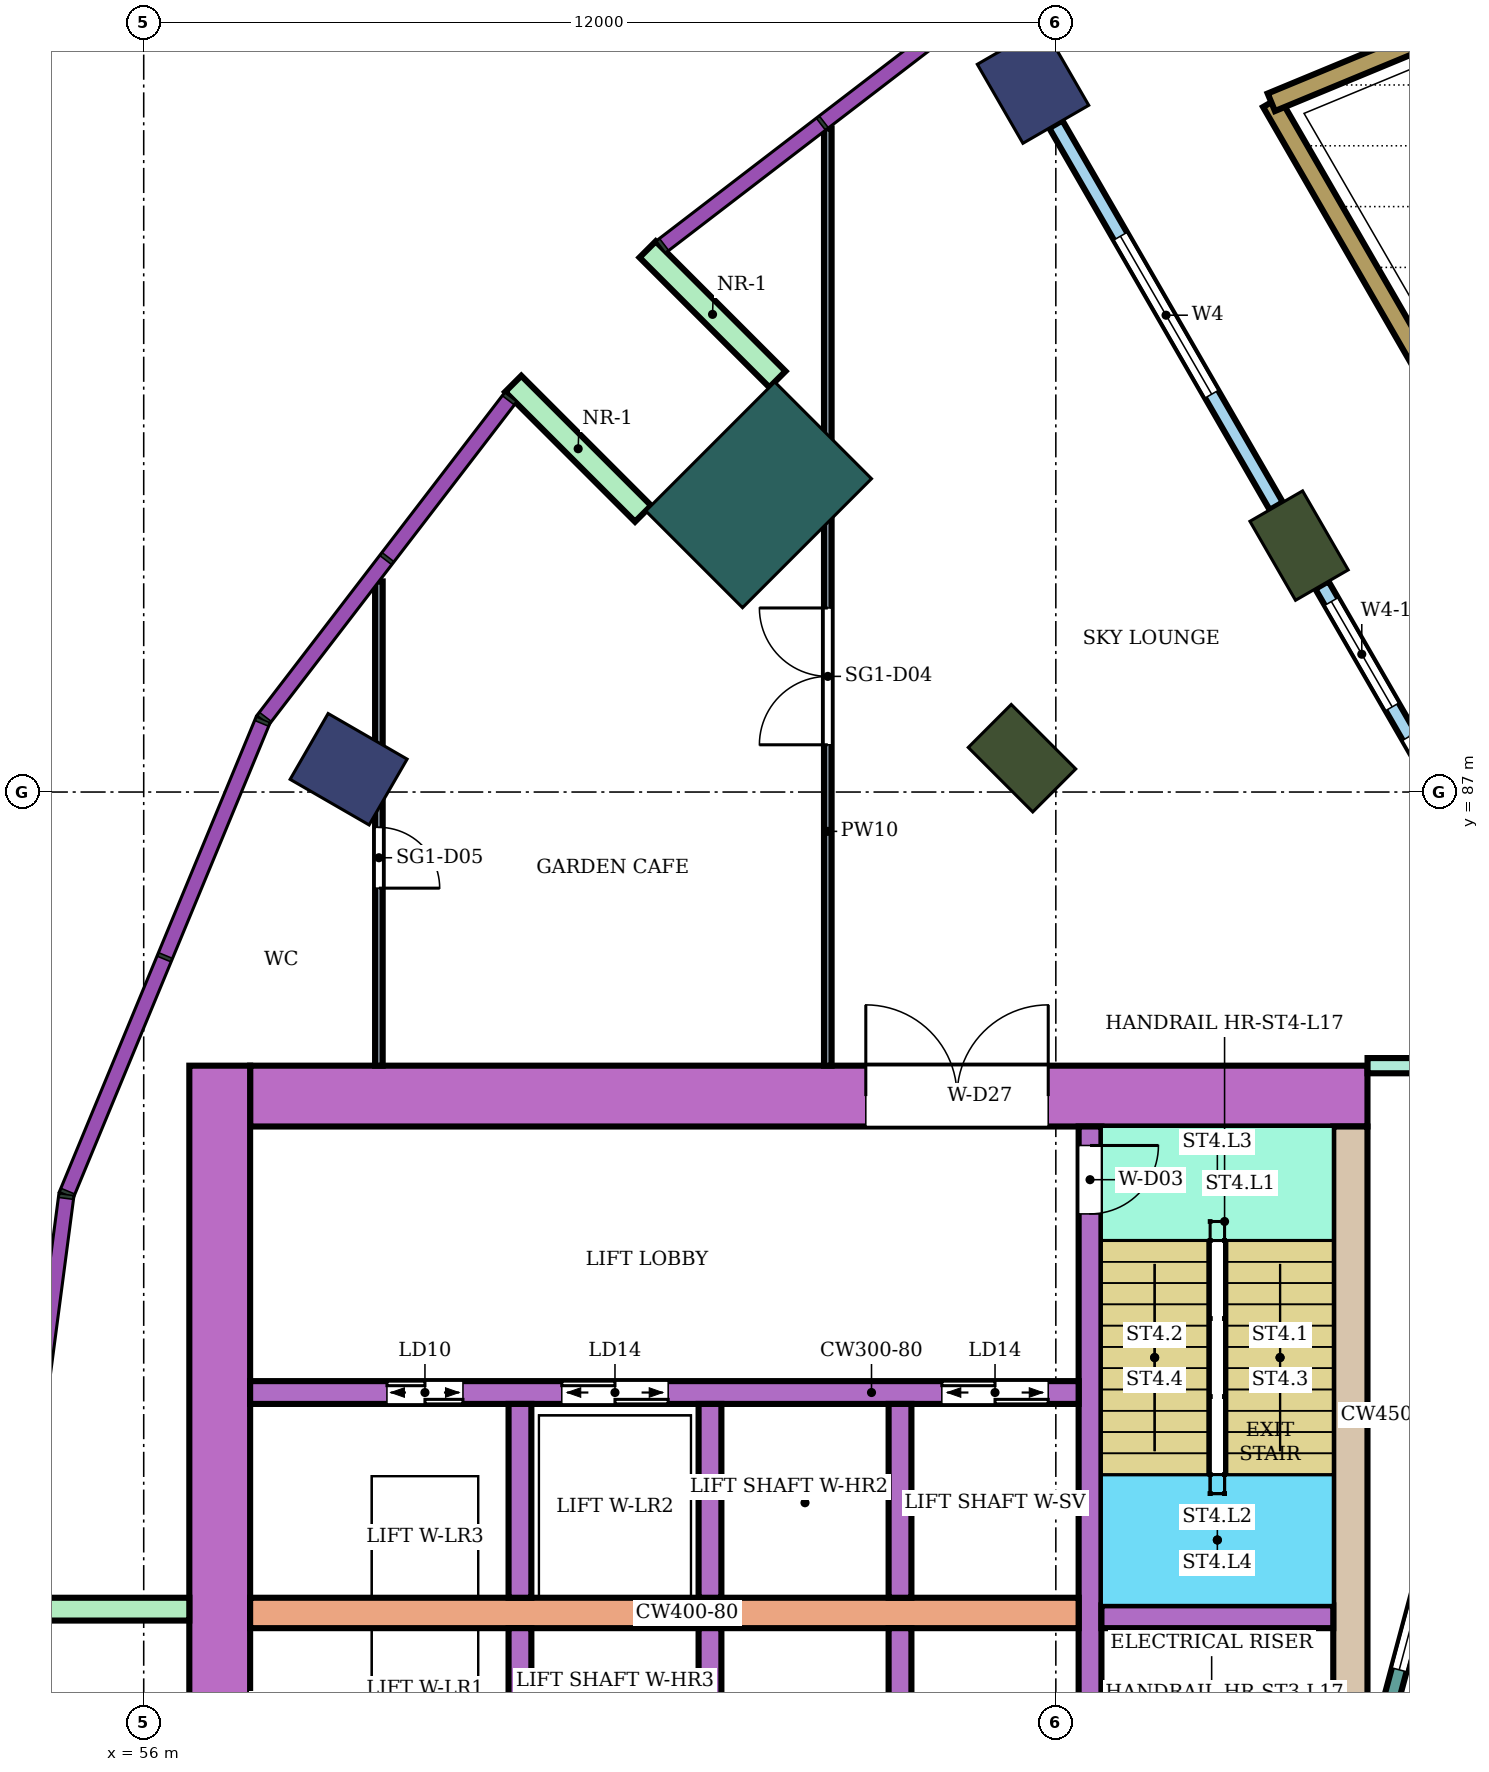
"""IFC4 building model, lengths in metres.
Left out: names, types, materials, properties, quantities, classifications, styles, units other than length and angle.
Written with IfcOpenShell. Run it as: python <this file> out.ifc"""

import sys

from ifc_helpers import new_model, si_unit, direction, frame, frame_2d, origin, origin_2d, place, context, subcontext, project, spatial, rectangle, extrude, element, fill, save


model = new_model("IFC4")
c1 = context("Model", 3, precision=1e-05, world=origin(), true_north=direction((0.0, 1.0)))
c2 = subcontext(c1, "Body", "Model", "MODEL_VIEW")
j1 = project(units=[si_unit("LENGTHUNIT", "METRE"), si_unit("PLANEANGLEUNIT", "RADIAN")], contexts=[c1])
p1 = place(None, origin())
s1 = spatial("IfcSite", under=j1, at=p1, CompositionType="ELEMENT")
p2 = place(p1, origin())
s2 = spatial("IfcBuilding", under=s1, at=p2, CompositionType="ELEMENT")
p3 = place(p2, frame((0.0, 0.0, 74.4)))
s3 = spatial("IfcBuildingStorey", under=s2, at=p3, CompositionType="ELEMENT", Elevation=74.4)
for number, where, z_axis, x_axis in (
    (1, (67.7, 96.304, 0.0), (0.0, 0.0, 1.0), (-0.5, 0.866, 0.0)),
    (2, (58.696, 87.3, 0.0), (0.0, 0.0, 1.0), (-0.866, 0.5, 0.0)),
):
    element("IfcColumn", number, at=place(p3, frame(where, z_axis=z_axis, x_axis=x_axis)), inside=s3, PredefinedType="COLUMN", context=c2, shape_type="SweptSolid", body=[
        extrude(rectangle(XDim=1.2, YDim=1.0, at=origin_2d()), origin(), (0.0, 0.0, 1.0), 8.0),
    ])
for number, where, z_axis, x_axis in (
    (3, (71.2, 90.242, 0.0), (0.0, 0.0, 1.0), (-0.5, 0.866, 0.0)),
    (4, (67.555, 87.445, 0.0), (0.0, 0.0, 1.0), (-0.707, 0.707, 0.0)),
):
    element("IfcColumn", number, at=place(p3, frame(where, z_axis=z_axis, x_axis=x_axis)), inside=s3, PredefinedType="COLUMN", context=c2, shape_type="SweptSolid", body=[
        extrude(rectangle(XDim=1.2, YDim=0.8, at=origin_2d()), origin(), (0.0, 0.0, 1.0), 8.0),
    ])
p4 = place(p3, frame((64.09, 90.91, 0.0), z_axis=(0.0, 0.0, 1.0), x_axis=(-0.707106781187, 0.707106781187, 0.0)))
e5 = element("IfcColumn", 5, at=p4, inside=s3, PredefinedType="COLUMN", context=c2, shape_type="SweptSolid", body=[
    extrude(rectangle(XDim=1.8, YDim=2.4, at=origin_2d()), origin(), (0.0, 0.0, 1.0), 8.0),
])
p5 = place(p3, frame((72.1, 83.0, 0.0), z_axis=(0.0, 0.0, 1.0), x_axis=(-1.0, 0.0, 0.0)))
e6 = element("IfcWall", 6, at=p5, inside=s3, PredefinedType="SHEAR", context=c2, shape_type="SweptSolid", body=[
    extrude(rectangle(XDim=14.7, YDim=0.8, at=frame_2d((7.35, 0.0))), origin(), (0.0, 0.0, 1.0), 7.68),
])
p6 = place(p5, frame((4.2, 0.0, 0.0)))
e7 = element("IfcOpeningElement", 7, at=p6, cuts=e6, PredefinedType="OPENING", context=c2, shape_type="SweptSolid", body=[
    extrude(rectangle(XDim=2.4, YDim=2.4, at=frame_2d((1.2, 1.2))), frame((0.0, 0.41, 0.0), z_axis=(0.0, -1.0, 0.0), x_axis=(1.0, 0.0, 0.0)), (0.0, 0.0, 1.0), 0.82),
])
p7 = place(p3, frame((71.875, 82.6, 0.0), z_axis=(0.0, 0.0, 1.0), x_axis=(0.0, -1.0, 0.0)))
e8 = element("IfcWall", 8, at=p7, inside=s3, PredefinedType="SHEAR", context=c2, shape_type="SweptSolid", body=[
    extrude(rectangle(XDim=7.6, YDim=0.45, at=frame_2d((3.8, 0.0))), origin(), (0.0, 0.0, 1.0), 7.68),
])
p8 = place(p3, frame((57.0, 83.4, 0.0), z_axis=(0.0, 0.0, 1.0), x_axis=(0.0, -1.0, 0.0)))
e9 = element("IfcWall", 9, at=p8, inside=s3, PredefinedType="SHEAR", context=c2, shape_type="SweptSolid", body=[
    extrude(rectangle(XDim=16.8, YDim=0.8, at=frame_2d((8.4, 0.0))), origin(), (0.0, 0.0, 1.0), 7.68),
])
p9 = place(p3, frame((68.45, 82.6, 0.0), z_axis=(0.0, 0.0, 1.0), x_axis=(0.0, -1.0, 0.0)))
e10 = element("IfcWall", 10, at=p9, inside=s3, PredefinedType="SHEAR", context=c2, shape_type="SweptSolid", body=[
    extrude(rectangle(XDim=7.6, YDim=0.3, at=frame_2d((3.8, 0.0))), origin(), (0.0, 0.0, 1.0), 7.68),
])
p10 = place(p9, frame((0.25, 0.0, 0.0)))
e11 = element("IfcOpeningElement", 11, at=p10, cuts=e10, PredefinedType="OPENING", context=c2, shape_type="SweptSolid", body=[
    extrude(rectangle(XDim=0.9, YDim=2.1, at=frame_2d((0.45, 1.05))), frame((0.0, 0.16, 0.0), z_axis=(0.0, -1.0, 0.0), x_axis=(1.0, 0.0, 0.0)), (0.0, 0.0, 1.0), 0.32),
])
p11 = place(p3, frame((71.65, 76.15, 0.0), z_axis=(0.0, 0.0, 1.0), x_axis=(-1.0, 0.0, 0.0)))
e12 = element("IfcWall", 12, at=p11, inside=s3, PredefinedType="SHEAR", context=c2, shape_type="SweptSolid", body=[
    extrude(rectangle(XDim=3.05, YDim=0.3, at=frame_2d((1.525, 0.0))), origin(), (0.0, 0.0, 1.0), 7.68),
])
p12 = place(p3, frame((68.3, 76.2, 0.0), z_axis=(0.0, 0.0, 1.0), x_axis=(-1.0, 0.0, 0.0)))
e13 = element("IfcWall", 13, at=p12, inside=s3, PredefinedType="SHEAR", context=c2, shape_type="SweptSolid", body=[
    extrude(rectangle(XDim=10.9, YDim=0.4, at=frame_2d((5.45, 0.0))), origin(), (0.0, 0.0, 1.0), 7.68),
])
p13 = place(p3, frame((68.3, 79.1, 0.0), z_axis=(0.0, 0.0, 1.0), x_axis=(-1.0, 0.0, 0.0)))
e14 = element("IfcWall", 14, at=p13, inside=s3, PredefinedType="SHEAR", context=c2, shape_type="SweptSolid", body=[
    extrude(rectangle(XDim=10.9, YDim=0.3, at=frame_2d((5.45, 0.0))), origin(), (0.0, 0.0, 1.0), 7.68),
])
p14 = place(p13, frame((0.4, 0.0, 0.0)))
e15 = element("IfcOpeningElement", 15, at=p14, cuts=e14, PredefinedType="OPENING", context=c2, shape_type="SweptSolid", body=[
    extrude(rectangle(XDim=1.4, YDim=2.1, at=frame_2d((0.7, 1.05))), frame((0.0, 0.16, 0.0), z_axis=(0.0, -1.0, 0.0), x_axis=(1.0, 0.0, 0.0)), (0.0, 0.0, 1.0), 0.32),
])
p15 = place(p13, frame((5.4, 0.0, 0.0)))
e16 = element("IfcOpeningElement", 16, at=p15, cuts=e14, PredefinedType="OPENING", context=c2, shape_type="SweptSolid", body=[
    extrude(rectangle(XDim=1.4, YDim=2.1, at=frame_2d((0.7, 1.05))), frame((0.0, 0.16, 0.0), z_axis=(0.0, -1.0, 0.0), x_axis=(1.0, 0.0, 0.0)), (0.0, 0.0, 1.0), 0.32),
])
p16 = place(p13, frame((8.1, 0.0, 0.0)))
e17 = element("IfcOpeningElement", 17, at=p16, cuts=e14, PredefinedType="OPENING", context=c2, shape_type="SweptSolid", body=[
    extrude(rectangle(XDim=1.0, YDim=2.1, at=frame_2d((0.5, 1.05))), frame((0.0, 0.16, 0.0), z_axis=(0.0, -1.0, 0.0), x_axis=(1.0, 0.0, 0.0)), (0.0, 0.0, 1.0), 0.32),
])
for number, where, z_axis, x_axis in (
    (18, (65.95, 76.0, 0.0), (0.0, 0.0, 1.0), (0.0, -1.0, 0.0)),
    (19, (63.45, 76.0, 0.0), (0.0, 0.0, 1.0), (0.0, -1.0, 0.0)),
    (20, (60.95, 76.0, 0.0), (0.0, 0.0, 1.0), (0.0, -1.0, 0.0)),
    (21, (65.95, 78.95, 0.0), (0.0, 0.0, 1.0), (0.0, -1.0, 0.0)),
    (22, (63.45, 78.95, 0.0), (0.0, 0.0, 1.0), (0.0, -1.0, 0.0)),
    (23, (60.95, 78.95, 0.0), (0.0, 0.0, 1.0), (0.0, -1.0, 0.0)),
):
    element("IfcWall", number, at=place(p3, frame(where, z_axis=z_axis, x_axis=x_axis)), inside=s3, PredefinedType="SHEAR", context=c2, shape_type="SweptSolid", body=[
        extrude(rectangle(XDim=2.55, YDim=0.3, at=frame_2d((1.275, 0.0))), origin(), (0.0, 0.0, 1.0), 7.68),
    ])
for number, where, z_axis, x_axis in (
    (24, (64.338, 92.43, 0.0), (0.0, 0.0, 1.0), (-0.707, 0.707, 0.0)),
    (25, (62.57, 90.662, 0.0), (0.0, 0.0, 1.0), (-0.707, 0.707, 0.0)),
    (26, (56.6, 76.25, 0.0), (0.0, 0.0, 1.0), (-1.0, 0.0, 0.0)),
):
    element("IfcWall", number, at=place(p3, frame(where, z_axis=z_axis, x_axis=x_axis)), inside=s3, PredefinedType="NOTDEFINED", context=c2, shape_type="SweptSolid", body=[
        extrude(rectangle(XDim=2.416, YDim=0.3, at=frame_2d((1.208, 0.0))), origin(), (0.0, 0.0, 1.0), 8.0),
    ])
p17 = place(p3, frame((73.415, 78.802, 0.0), z_axis=(0.0, 0.0, 1.0), x_axis=(-0.258789828301, -0.965933654434, 0.0)))
e27 = element("IfcWall", 27, at=p17, inside=s3, PredefinedType="NOTDEFINED", context=c2, shape_type="SweptSolid", body=[
    extrude(rectangle(XDim=3.936, YDim=0.2, at=frame_2d((1.968, 0.0))), origin(), (0.0, 0.0, 1.0), 8.0),
])
p18 = place(p17, frame((0.468, 0.0, 0.9)))
e28 = element("IfcOpeningElement", 28, at=p18, cuts=e27, PredefinedType="OPENING", context=c2, shape_type="SweptSolid", body=[
    extrude(rectangle(XDim=3.0, YDim=2.3, at=frame_2d((1.5, 1.15))), frame((0.0, 0.11, 0.0), z_axis=(0.0, -1.0, 0.0), x_axis=(1.0, 0.0, 0.0)), (0.0, 0.0, 1.0), 0.22),
])
p19 = place(p3, frame((70.835, 96.074, 0.0), z_axis=(0.0, 0.0, 1.0), x_axis=(0.500003486784, -0.866023390679, 0.0)))
e29 = element("IfcWall", 29, at=p19, inside=s3, PredefinedType="USERDEFINED", context=c2, shape_type="SweptSolid", body=[
    extrude(rectangle(XDim=5.966, YDim=0.25, at=frame_2d((2.983, 0.0))), origin(), (0.0, 0.0, 1.0), 0.6),
])
p20 = place(p3, frame((73.986, 97.38, 0.0), z_axis=(0.0, 0.0, 1.0), x_axis=(-0.923871147788, -0.38270367425, 0.0)))
e30 = element("IfcWall", 30, at=p20, inside=s3, PredefinedType="USERDEFINED", context=c2, shape_type="SweptSolid", body=[
    extrude(rectangle(XDim=3.411, YDim=0.25, at=frame_2d((1.706, 0.0))), origin(), (0.0, 0.0, 1.0), 0.6),
])
p21 = place(p3, frame((75.475, 82.838, 0.0), z_axis=(0.0, 0.0, 1.0), x_axis=(-0.50001663867, 0.86601579723, 0.0)))
e31 = element("IfcWall", 31, at=p21, inside=s3, PredefinedType="NOTDEFINED", context=c2, shape_type="SweptSolid", body=[
    extrude(rectangle(XDim=7.95, YDim=0.2, at=frame_2d((3.975, 0.0))), origin(), (0.0, 0.0, 1.0), 8.0),
])
p22 = place(p21, frame((1.0, 0.0, 0.3)))
e32 = element("IfcOpeningElement", 32, at=p22, cuts=e31, PredefinedType="OPENING", context=c2, shape_type="SweptSolid", body=[
    extrude(rectangle(XDim=2.4, YDim=3.6, at=frame_2d((1.2, 1.8))), frame((0.0, 0.11, 0.0), z_axis=(0.0, -1.0, 0.0), x_axis=(1.0, 0.0, 0.0)), (0.0, 0.0, 1.0), 0.22),
])
p23 = place(p21, frame((3.85, 0.0, 0.0)))
e33 = element("IfcOpeningElement", 33, at=p23, cuts=e31, PredefinedType="OPENING", context=c2, shape_type="SweptSolid", body=[
    extrude(rectangle(XDim=1.8, YDim=2.4, at=frame_2d((0.9, 1.2))), frame((0.0, 0.11, 0.0), z_axis=(0.0, -1.0, 0.0), x_axis=(1.0, 0.0, 0.0)), (0.0, 0.0, 1.0), 0.22),
])
p24 = place(p21, frame((6.1, 0.0, 0.3)))
e34 = element("IfcOpeningElement", 34, at=p24, cuts=e31, PredefinedType="OPENING", context=c2, shape_type="SweptSolid", body=[
    extrude(rectangle(XDim=1.6, YDim=3.6, at=frame_2d((0.8, 1.8))), frame((0.0, 0.11, 0.0), z_axis=(0.0, -1.0, 0.0), x_axis=(1.0, 0.0, 0.0)), (0.0, 0.0, 1.0), 0.22),
])
p25 = place(p3, frame((70.9, 90.762, 0.0), z_axis=(0.0, 0.0, 1.0), x_axis=(-0.499987231761, 0.866032775405, 0.0)))
e35 = element("IfcWall", 35, at=p25, inside=s3, PredefinedType="NOTDEFINED", context=c2, shape_type="SweptSolid", body=[
    extrude(rectangle(XDim=5.8, YDim=0.2, at=frame_2d((2.9, 0.0))), origin(), (0.0, 0.0, 1.0), 8.0),
])
p26 = place(p25, frame((1.7, 0.0, 0.3)))
e36 = element("IfcOpeningElement", 36, at=p26, cuts=e35, PredefinedType="OPENING", context=c2, shape_type="SweptSolid", body=[
    extrude(rectangle(XDim=2.4, YDim=3.6, at=frame_2d((1.2, 1.8))), frame((0.0, 0.11, 0.0), z_axis=(0.0, -1.0, 0.0), x_axis=(1.0, 0.0, 0.0)), (0.0, 0.0, 1.0), 0.22),
])
p27 = place(p3, frame((72.101, 83.4, 0.0), z_axis=(0.0, 0.0, 1.0), x_axis=(1.0, 0.0, 0.0)))
e37 = element("IfcWall", 37, at=p27, inside=s3, PredefinedType="PARTITIONING", context=c2, shape_type="SweptSolid", body=[
    extrude(rectangle(XDim=3.048, YDim=0.2, at=frame_2d((1.524, 0.0))), origin(), (0.0, 0.0, 1.0), 7.55),
])
p28 = place(p3, frame((59.094, 83.4, 0.0), z_axis=(0.0, 0.0, 1.0), x_axis=(0.0, 1.0, 0.0)))
e38 = element("IfcWall", 38, at=p28, inside=s3, PredefinedType="PARTITIONING", context=c2, shape_type="SweptSolid", body=[
    extrude(rectangle(XDim=6.371, YDim=0.1, at=frame_2d((3.186, 0.0))), origin(), (0.0, 0.0, 1.0), 7.55),
])
p29 = place(p28, frame((2.335, 0.0, 0.0)))
e39 = element("IfcOpeningElement", 39, at=p29, cuts=e38, PredefinedType="OPENING", context=c2, shape_type="SweptSolid", body=[
    extrude(rectangle(XDim=0.8, YDim=2.1, at=frame_2d((0.4, 1.05))), frame((0.0, 0.06, 0.0), z_axis=(0.0, -1.0, 0.0), x_axis=(1.0, 0.0, 0.0)), (0.0, 0.0, 1.0), 0.12),
])
p30 = place(p3, frame((65.0, 83.4, 0.0), z_axis=(0.0, 0.0, 1.0), x_axis=(0.0, 1.0, 0.0)))
e40 = element("IfcWall", 40, at=p30, inside=s3, PredefinedType="PARTITIONING", context=c2, shape_type="SweptSolid", body=[
    extrude(rectangle(XDim=12.33, YDim=0.1, at=frame_2d((6.165, 0.0))), origin(), (0.0, 0.0, 1.0), 7.55),
])
p31 = place(p30, frame((4.221, 0.0, 0.0)))
e41 = element("IfcOpeningElement", 41, at=p31, cuts=e40, PredefinedType="OPENING", context=c2, shape_type="SweptSolid", body=[
    extrude(rectangle(XDim=1.8, YDim=2.1, at=frame_2d((0.9, 1.05))), frame((0.0, 0.06, 0.0), z_axis=(0.0, -1.0, 0.0), x_axis=(1.0, 0.0, 0.0)), (0.0, 0.0, 1.0), 0.12),
])
p32 = place(p18, origin())
e42 = element("IfcWindow", 42, at=p32, inside=s3, PartitioningType="SINGLE_PANEL", PredefinedType="WINDOW", context=c2, shape_type="SweptSolid", body=[
    extrude(rectangle(XDim=3.0, YDim=2.3, at=frame_2d((1.5, 1.15))), frame((0.0, 0.03, 0.0), z_axis=(0.0, -1.0, 0.0), x_axis=(1.0, 0.0, 0.0)), (0.0, 0.0, 1.0), 0.06),
])
fill(e28, e42)
p33 = place(p23, frame((1.8, 0.0, 0.0), z_axis=(0.0, 0.0, 1.0), x_axis=(-1.0, 0.0, 0.0)))
e43 = element("IfcDoor", 43, at=p33, inside=s3, OperationType="DOUBLE_DOOR_SINGLE_SWING", PredefinedType="DOOR", context=c2, shape_type="SweptSolid", body=[
    extrude(rectangle(XDim=1.8, YDim=2.4, at=frame_2d((0.9, 1.2))), frame((0.0, 0.025, 0.0), z_axis=(0.0, -1.0, 0.0), x_axis=(1.0, 0.0, 0.0)), (0.0, 0.0, 1.0), 0.05),
])
fill(e33, e43)
p34 = place(p24, origin())
e44 = element("IfcWindow", 44, at=p34, inside=s3, PartitioningType="SINGLE_PANEL", PredefinedType="WINDOW", context=c2, shape_type="SweptSolid", body=[
    extrude(rectangle(XDim=1.6, YDim=3.6, at=frame_2d((0.8, 1.8))), frame((0.0, 0.03, 0.0), z_axis=(0.0, -1.0, 0.0), x_axis=(1.0, 0.0, 0.0)), (0.0, 0.0, 1.0), 0.06),
])
fill(e34, e44)
p35 = place(p26, origin())
e45 = element("IfcWindow", 45, at=p35, inside=s3, PartitioningType="SINGLE_PANEL", PredefinedType="WINDOW", context=c2, shape_type="SweptSolid", body=[
    extrude(rectangle(XDim=2.4, YDim=3.6, at=frame_2d((1.2, 1.8))), frame((0.0, 0.03, 0.0), z_axis=(0.0, -1.0, 0.0), x_axis=(1.0, 0.0, 0.0)), (0.0, 0.0, 1.0), 0.06),
])
fill(e36, e45)
p36 = place(p31, origin())
e46 = element("IfcDoor", 46, at=p36, inside=s3, OperationType="DOUBLE_DOOR_SINGLE_SWING", PredefinedType="DOOR", context=c2, shape_type="SweptSolid", body=[
    extrude(rectangle(XDim=1.8, YDim=2.1, at=frame_2d((0.9, 1.05))), frame((0.0, 0.025, 0.0), z_axis=(0.0, -1.0, 0.0), x_axis=(1.0, 0.0, 0.0)), (0.0, 0.0, 1.0), 0.05),
])
fill(e41, e46)
p37 = place(p29, frame((0.8, 0.0, 0.0), z_axis=(0.0, 0.0, 1.0), x_axis=(-1.0, 0.0, 0.0)))
e47 = element("IfcDoor", 47, at=p37, inside=s3, OperationType="SINGLE_SWING_RIGHT", PredefinedType="DOOR", context=c2, shape_type="SweptSolid", body=[
    extrude(rectangle(XDim=0.8, YDim=2.1, at=frame_2d((0.4, 1.05))), frame((0.0, 0.025, 0.0), z_axis=(0.0, -1.0, 0.0), x_axis=(1.0, 0.0, 0.0)), (0.0, 0.0, 1.0), 0.05),
])
fill(e39, e47)
p38 = place(p10, origin())
e48 = element("IfcDoor", 48, at=p38, inside=s3, OperationType="SINGLE_SWING_LEFT", PredefinedType="DOOR", context=c2, shape_type="SweptSolid", body=[
    extrude(rectangle(XDim=0.9, YDim=2.1, at=frame_2d((0.45, 1.05))), frame((0.0, 0.025, 0.0), z_axis=(0.0, -1.0, 0.0), x_axis=(1.0, 0.0, 0.0)), (0.0, 0.0, 1.0), 0.05),
])
fill(e11, e48)
p39 = place(p14, origin())
e49 = element("IfcDoor", 49, at=p39, inside=s3, OperationType="DOUBLE_DOOR_SLIDING", PredefinedType="DOOR", context=c2, shape_type="SweptSolid", body=[
    extrude(rectangle(XDim=1.4, YDim=2.1, at=frame_2d((0.7, 1.05))), frame((0.0, 0.025, 0.0), z_axis=(0.0, -1.0, 0.0), x_axis=(1.0, 0.0, 0.0)), (0.0, 0.0, 1.0), 0.05),
])
fill(e15, e49)
p40 = place(p15, origin())
e50 = element("IfcDoor", 50, at=p40, inside=s3, OperationType="DOUBLE_DOOR_SLIDING", PredefinedType="DOOR", context=c2, shape_type="SweptSolid", body=[
    extrude(rectangle(XDim=1.4, YDim=2.1, at=frame_2d((0.7, 1.05))), frame((0.0, 0.025, 0.0), z_axis=(0.0, -1.0, 0.0), x_axis=(1.0, 0.0, 0.0)), (0.0, 0.0, 1.0), 0.05),
])
fill(e16, e50)
p41 = place(p16, origin())
e51 = element("IfcDoor", 51, at=p41, inside=s3, OperationType="DOUBLE_DOOR_SLIDING", PredefinedType="DOOR", context=c2, shape_type="SweptSolid", body=[
    extrude(rectangle(XDim=1.0, YDim=2.1, at=frame_2d((0.5, 1.05))), frame((0.0, 0.025, 0.0), z_axis=(0.0, -1.0, 0.0), x_axis=(1.0, 0.0, 0.0)), (0.0, 0.0, 1.0), 0.05),
])
fill(e17, e51)
p42 = place(p6, frame((2.4, 0.0, 0.0), z_axis=(0.0, 0.0, 1.0), x_axis=(-1.0, 0.0, 0.0)))
e52 = element("IfcDoor", 52, at=p42, inside=s3, OperationType="DOUBLE_DOOR_SINGLE_SWING", PredefinedType="DOOR", context=c2, shape_type="SweptSolid", body=[
    extrude(rectangle(XDim=2.4, YDim=2.4, at=frame_2d((1.2, 1.2))), frame((0.0, 0.025, 0.0), z_axis=(0.0, -1.0, 0.0), x_axis=(1.0, 0.0, 0.0)), (0.0, 0.0, 1.0), 0.05),
])
fill(e7, e52)
save(model, sys.argv[1])
